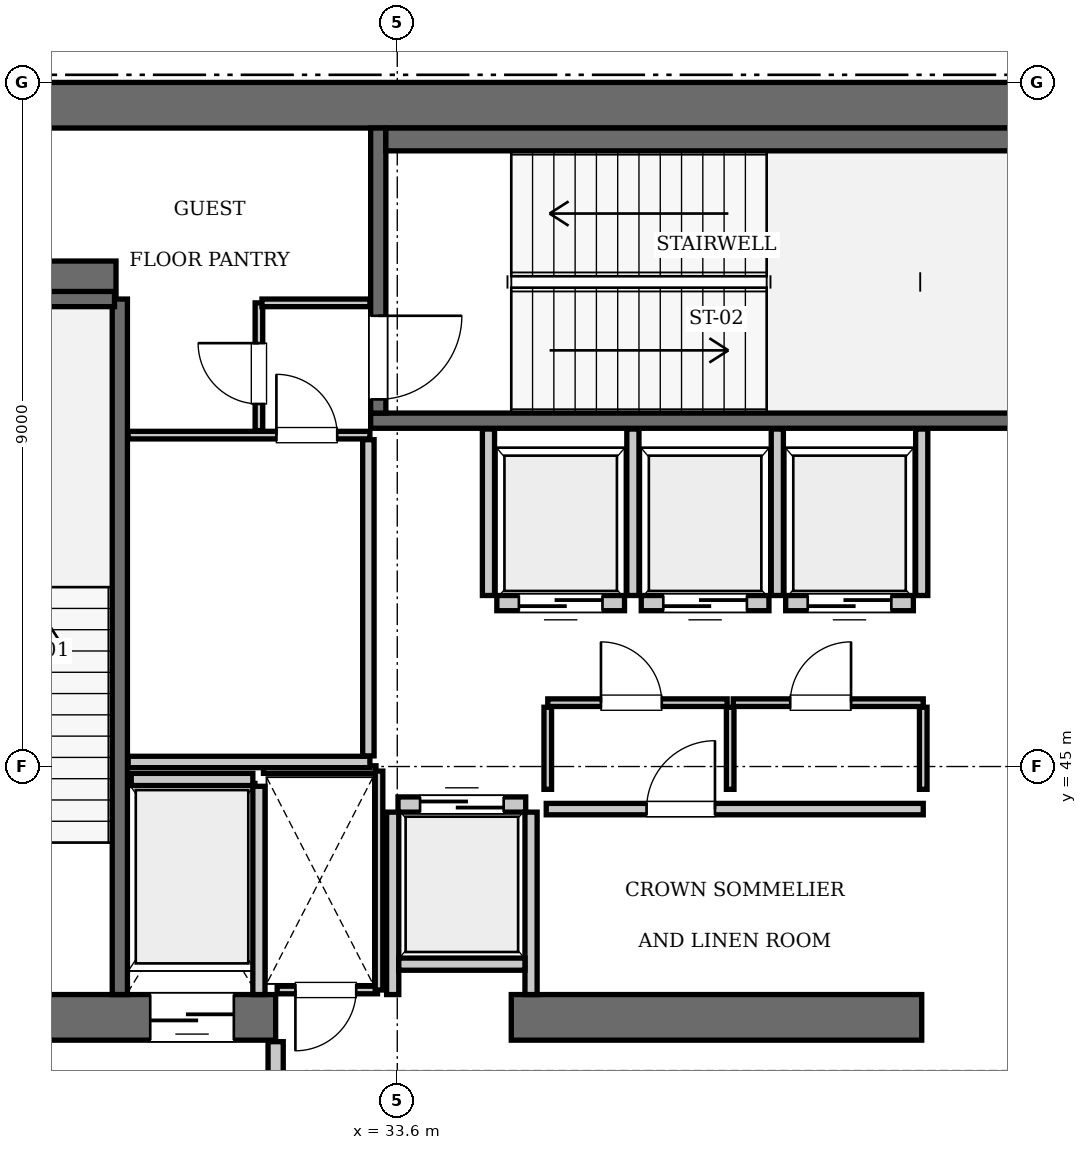
"""IFC4 building model, lengths in metres.
Left out: names, types, materials, properties, quantities, classifications, styles, units other than length and angle.
Written with IfcOpenShell. Run it as: python <this file> out.ifc"""

import sys

from ifc_helpers import new_model, si_unit, direction, frame, frame_2d, origin, place, context, subcontext, project, spatial, rectangle, extrude, element, fill, save


model = new_model("IFC4")
c1 = context("Model", 3, precision=1e-05, world=origin(), true_north=direction((0.0, 1.0)))
c2 = subcontext(c1, "Body", "Model", "MODEL_VIEW")
j1 = project(units=[si_unit("LENGTHUNIT", "METRE"), si_unit("PLANEANGLEUNIT", "RADIAN")], contexts=[c1])
p1 = place(None, origin())
s1 = spatial("IfcSite", under=j1, at=p1, CompositionType="ELEMENT")
p2 = place(p1, origin())
s2 = spatial("IfcBuilding", under=s1, at=p2, CompositionType="ELEMENT")
p3 = place(p2, frame((0.0, 0.0, 349.65)))
s3 = spatial("IfcBuildingStorey", under=s2, at=p3, CompositionType="ELEMENT", Elevation=349.65)
p4 = place(p3, frame((25.2, 53.7, 0.0), z_axis=(0.0, 0.0, 1.0), x_axis=(1.0, 0.0, 0.0)))
e1 = element("IfcWall", 1, at=p4, inside=s3, PredefinedType="SHEAR", context=c2, shape_type="SweptSolid", body=[
    extrude(rectangle(XDim=25.2, YDim=0.6, at=frame_2d((12.6, 0.0))), origin(), (0.0, 0.0, 1.0), 4.55),
])
p5 = place(p3, frame((25.2, 41.7, 0.0), z_axis=(0.0, 0.0, 1.0), x_axis=(1.0, 0.0, 0.0)))
e2 = element("IfcWall", 2, at=p5, inside=s3, PredefinedType="SHEAR", context=c2, shape_type="SweptSolid", body=[
    extrude(rectangle(XDim=6.8, YDim=0.6, at=frame_2d((3.4, 0.0))), origin(), (0.0, 0.0, 1.0), 4.55),
])
p6 = place(p5, frame((1.65, 0.0, 0.0)))
e3 = element("IfcOpeningElement", 3, at=p6, cuts=e2, PredefinedType="OPENING", context=c2, shape_type="SweptSolid", body=[
    extrude(rectangle(XDim=1.15, YDim=2.15, at=frame_2d((0.575, 1.075))), frame((0.0, 0.31, 0.0), z_axis=(0.0, -1.0, 0.0), x_axis=(1.0, 0.0, 0.0)), (0.0, 0.0, 1.0), 0.62),
])
p7 = place(p5, frame((5.15, 0.0, 0.0)))
e4 = element("IfcOpeningElement", 4, at=p7, cuts=e2, PredefinedType="OPENING", context=c2, shape_type="SweptSolid", body=[
    extrude(rectangle(XDim=1.1, YDim=2.2, at=frame_2d((0.55, 1.1))), frame((0.0, 0.31, 0.0), z_axis=(0.0, -1.0, 0.0), x_axis=(1.0, 0.0, 0.0)), (0.0, 0.0, 1.0), 0.62),
])
p8 = place(p3, frame((35.1, 41.7, 0.0), z_axis=(0.0, 0.0, 1.0), x_axis=(1.0, 0.0, 0.0)))
e5 = element("IfcWall", 5, at=p8, inside=s3, PredefinedType="SHEAR", context=c2, shape_type="SweptSolid", body=[
    extrude(rectangle(XDim=5.4, YDim=0.6, at=frame_2d((2.7, 0.0))), origin(), (0.0, 0.0, 1.0), 4.55),
])
p9 = place(p3, frame((25.8, 51.4, 0.0), z_axis=(0.0, 0.0, 1.0), x_axis=(1.0, 0.0, 0.0)))
e6 = element("IfcWall", 6, at=p9, inside=s3, PredefinedType="SHEAR", context=c2, shape_type="SweptSolid", body=[
    extrude(rectangle(XDim=4.1, YDim=0.5, at=frame_2d((2.05, 0.0))), origin(), (0.0, 0.0, 1.0), 4.55),
])
p10 = place(p3, frame((29.95, 42.0, 0.0), z_axis=(0.0, 0.0, 1.0), x_axis=(0.0, 1.0, 0.0)))
e7 = element("IfcWall", 7, at=p10, inside=s3, PredefinedType="SOLIDWALL", context=c2, shape_type="SweptSolid", body=[
    extrude(rectangle(XDim=9.15, YDim=0.2, at=frame_2d((4.575, 0.0))), origin(), (0.0, 0.0, 1.0), 4.29),
])
p11 = place(p3, frame((26.38, 51.15, 0.0), z_axis=(0.0, 0.0, 1.0), x_axis=(1.0, 0.0, 0.0)))
e8 = element("IfcWall", 8, at=p11, inside=s3, PredefinedType="SOLIDWALL", context=c2, shape_type="SweptSolid", body=[
    extrude(rectangle(XDim=3.5, YDim=0.2, at=frame_2d((1.75, 0.0))), origin(), (0.0, 0.0, 1.0), 4.29),
])
p12 = place(p3, frame((33.25, 49.55, 0.0), z_axis=(0.0, 0.0, 1.0), x_axis=(1.0, 0.0, 0.0)))
e9 = element("IfcWall", 9, at=p12, inside=s3, PredefinedType="SOLIDWALL", context=c2, shape_type="SweptSolid", body=[
    extrude(rectangle(XDim=9.1, YDim=0.2, at=frame_2d((4.55, 0.0))), origin(), (0.0, 0.0, 1.0), 4.29),
])
p13 = place(p3, frame((33.35, 49.65, 0.0), z_axis=(0.0, 0.0, 1.0), x_axis=(0.0, 1.0, 0.0)))
e10 = element("IfcWall", 10, at=p13, inside=s3, PredefinedType="SOLIDWALL", context=c2, shape_type="SweptSolid", body=[
    extrude(rectangle(XDim=3.75, YDim=0.2, at=frame_2d((1.875, 0.0))), origin(), (0.0, 0.0, 1.0), 4.29),
])
p14 = place(p13, frame((0.18, 0.0, 0.0)))
e11 = element("IfcOpeningElement", 11, at=p14, cuts=e10, PredefinedType="OPENING", context=c2, shape_type="SweptSolid", body=[
    extrude(rectangle(XDim=1.1, YDim=2.15, at=frame_2d((0.55, 1.075))), frame((0.0, 0.11, 0.0), z_axis=(0.0, -1.0, 0.0), x_axis=(1.0, 0.0, 0.0)), (0.0, 0.0, 1.0), 0.22),
])
p15 = place(p3, frame((33.45, 53.25, 0.0), z_axis=(0.0, 0.0, 1.0), x_axis=(1.0, 0.0, 0.0)))
e12 = element("IfcWall", 12, at=p15, inside=s3, PredefinedType="SOLIDWALL", context=c2, shape_type="SweptSolid", body=[
    extrude(rectangle(XDim=8.7, YDim=0.3, at=frame_2d((4.35, 0.0))), origin(), (0.0, 0.0, 1.0), 4.29),
])
p16 = place(p3, frame((34.91, 47.15, 0.0), z_axis=(0.0, 0.0, 1.0), x_axis=(1.0, 0.0, 0.0)))
e13 = element("IfcWall", 13, at=p16, inside=s3, PredefinedType="SOLIDWALL", context=c2, shape_type="SweptSolid", body=[
    extrude(rectangle(XDim=1.68, YDim=0.2, at=frame_2d((0.84, 0.0))), origin(), (0.0, 0.0, 1.0), 4.29),
])
p17 = place(p16, frame((0.29, 0.0, 0.0)))
e14 = element("IfcOpeningElement", 14, at=p17, cuts=e13, PredefinedType="OPENING", context=c2, shape_type="SweptSolid", body=[
    extrude(rectangle(XDim=1.1, YDim=2.2, at=frame_2d((0.55, 1.1))), frame((0.0, 0.11, 0.0), z_axis=(0.0, -1.0, 0.0), x_axis=(1.0, 0.0, 0.0)), (0.0, 0.0, 1.0), 0.22),
])
p18 = place(p3, frame((36.81, 47.15, 0.0), z_axis=(0.0, 0.0, 1.0), x_axis=(1.0, 0.0, 0.0)))
e15 = element("IfcWall", 15, at=p18, inside=s3, PredefinedType="SOLIDWALL", context=c2, shape_type="SweptSolid", body=[
    extrude(rectangle(XDim=1.68, YDim=0.2, at=frame_2d((0.84, 0.0))), origin(), (0.0, 0.0, 1.0), 4.29),
])
p19 = place(p18, frame((0.29, 0.0, 0.0)))
e16 = element("IfcOpeningElement", 16, at=p19, cuts=e15, PredefinedType="OPENING", context=c2, shape_type="SweptSolid", body=[
    extrude(rectangle(XDim=1.1, YDim=2.2, at=frame_2d((0.55, 1.1))), frame((0.0, 0.11, 0.0), z_axis=(0.0, -1.0, 0.0), x_axis=(1.0, 0.0, 0.0)), (0.0, 0.0, 1.0), 0.22),
])
p20 = place(p3, frame((38.71, 47.15, 0.0), z_axis=(0.0, 0.0, 1.0), x_axis=(1.0, 0.0, 0.0)))
e17 = element("IfcWall", 17, at=p20, inside=s3, PredefinedType="SOLIDWALL", context=c2, shape_type="SweptSolid", body=[
    extrude(rectangle(XDim=1.68, YDim=0.2, at=frame_2d((0.84, 0.0))), origin(), (0.0, 0.0, 1.0), 4.29),
])
p21 = place(p20, frame((0.29, 0.0, 0.0)))
e18 = element("IfcOpeningElement", 18, at=p21, cuts=e17, PredefinedType="OPENING", context=c2, shape_type="SweptSolid", body=[
    extrude(rectangle(XDim=1.1, YDim=2.2, at=frame_2d((0.55, 1.1))), frame((0.0, 0.11, 0.0), z_axis=(0.0, -1.0, 0.0), x_axis=(1.0, 0.0, 0.0)), (0.0, 0.0, 1.0), 0.22),
])
p22 = place(p3, frame((33.61, 44.5, 0.0), z_axis=(0.0, 0.0, 1.0), x_axis=(1.0, 0.0, 0.0)))
e19 = element("IfcWall", 19, at=p22, inside=s3, PredefinedType="SOLIDWALL", context=c2, shape_type="SweptSolid", body=[
    extrude(rectangle(XDim=1.68, YDim=0.2, at=frame_2d((0.84, 0.0))), origin(), (0.0, 0.0, 1.0), 4.29),
])
p23 = place(p22, frame((0.29, 0.0, 0.0)))
e20 = element("IfcOpeningElement", 20, at=p23, cuts=e19, PredefinedType="OPENING", context=c2, shape_type="SweptSolid", body=[
    extrude(rectangle(XDim=1.1, YDim=2.2, at=frame_2d((0.55, 1.1))), frame((0.0, 0.11, 0.0), z_axis=(0.0, -1.0, 0.0), x_axis=(1.0, 0.0, 0.0)), (0.0, 0.0, 1.0), 0.22),
])
p24 = place(p3, frame((30.1, 44.83, 0.0), z_axis=(0.0, 0.0, 1.0), x_axis=(1.0, 0.0, 0.0)))
e21 = element("IfcWall", 21, at=p24, inside=s3, PredefinedType="SOLIDWALL", context=c2, shape_type="SweptSolid", body=[
    extrude(rectangle(XDim=1.6, YDim=0.16, at=frame_2d((0.8, 0.0))), origin(), (0.0, 0.0, 1.0), 4.29),
])
p25 = place(p3, frame((31.78, 42.0, 0.0), z_axis=(0.0, 0.0, 1.0), x_axis=(0.0, 1.0, 0.0)))
e22 = element("IfcWall", 22, at=p25, inside=s3, PredefinedType="SOLIDWALL", context=c2, shape_type="SweptSolid", body=[
    extrude(rectangle(XDim=2.74, YDim=0.16, at=frame_2d((1.37, 0.0))), origin(), (0.0, 0.0, 1.0), 4.29),
])
for number, where, z_axis, x_axis in (
    (23, (34.8, 47.25, 0.0), (0.0, 0.0, 1.0), (0.0, 1.0, 0.0)),
    (24, (36.7, 47.25, 0.0), (0.0, 0.0, 1.0), (0.0, 1.0, 0.0)),
    (25, (38.6, 47.25, 0.0), (0.0, 0.0, 1.0), (0.0, 1.0, 0.0)),
    (26, (40.5, 47.25, 0.0), (0.0, 0.0, 1.0), (0.0, 1.0, 0.0)),
):
    element("IfcWall", number, at=place(p3, frame(where, z_axis=z_axis, x_axis=x_axis)), inside=s3, PredefinedType="SOLIDWALL", context=c2, shape_type="SweptSolid", body=[
        extrude(rectangle(XDim=2.19, YDim=0.16, at=frame_2d((1.095, 0.0))), origin(), (0.0, 0.0, 1.0), 4.29),
    ])
for number, where, z_axis, x_axis in (
    (27, (33.54, 42.0, 0.0), (0.0, 0.0, 1.0), (0.0, 1.0, 0.0)),
    (28, (35.36, 42.0, 0.0), (0.0, 0.0, 1.0), (0.0, 1.0, 0.0)),
):
    element("IfcWall", number, at=place(p3, frame(where, z_axis=z_axis, x_axis=x_axis)), inside=s3, PredefinedType="SOLIDWALL", context=c2, shape_type="SweptSolid", body=[
        extrude(rectangle(XDim=2.4, YDim=0.16, at=frame_2d((1.2, 0.0))), origin(), (0.0, 0.0, 1.0), 4.29),
    ])
p26 = place(p3, frame((33.62, 42.4, 0.0), z_axis=(0.0, 0.0, 1.0), x_axis=(1.0, 0.0, 0.0)))
e29 = element("IfcWall", 29, at=p26, inside=s3, PredefinedType="SOLIDWALL", context=c2, shape_type="SweptSolid", body=[
    extrude(rectangle(XDim=1.66, YDim=0.16, at=frame_2d((0.83, 0.0))), origin(), (0.0, 0.0, 1.0), 4.29),
])
p27 = place(p3, frame((32.0, 38.31, 0.0), z_axis=(0.0, 0.0, 1.0), x_axis=(0.0, 1.0, 0.0)))
e30 = element("IfcWall", 30, at=p27, inside=s3, PredefinedType="PARTITIONING", context=c2, shape_type="SweptSolid", body=[
    extrude(rectangle(XDim=3.07, YDim=0.2, at=frame_2d((1.535, 0.0))), origin(), (0.0, 0.0, 1.0), 4.29),
])
p28 = place(p3, frame((32.02, 42.06, 0.0), z_axis=(0.0, 0.0, 1.0), x_axis=(1.0, 0.0, 0.0)))
e31 = element("IfcWall", 31, at=p28, inside=s3, PredefinedType="PARTITIONING", context=c2, shape_type="SweptSolid", body=[
    extrude(rectangle(XDim=1.32, YDim=0.1, at=frame_2d((0.66, 0.0))), origin(), (0.0, 0.0, 1.0), 4.29),
])
p29 = place(p28, frame((0.24, 0.0, 0.0)))
e32 = element("IfcOpeningElement", 32, at=p29, cuts=e31, PredefinedType="OPENING", context=c2, shape_type="SweptSolid", body=[
    extrude(rectangle(XDim=0.8, YDim=2.05, at=frame_2d((0.4, 1.025))), frame((0.0, 0.06, 0.0), z_axis=(0.0, -1.0, 0.0), x_axis=(1.0, 0.0, 0.0)), (0.0, 0.0, 1.0), 0.12),
])
p30 = place(p3, frame((31.84, 44.96, 0.0), z_axis=(0.0, 0.0, 1.0), x_axis=(1.0, 0.0, 0.0)))
e33 = element("IfcWall", 33, at=p30, inside=s3, PredefinedType="PARTITIONING", context=c2, shape_type="SweptSolid", body=[
    extrude(rectangle(XDim=1.48, YDim=0.1, at=frame_2d((0.74, 0.0))), origin(), (0.0, 0.0, 1.0), 4.29),
])
p31 = place(p3, frame((33.36, 42.06, 0.0), z_axis=(0.0, 0.0, 1.0), x_axis=(0.0, 1.0, 0.0)))
e34 = element("IfcWall", 34, at=p31, inside=s3, PredefinedType="PARTITIONING", context=c2, shape_type="SweptSolid", body=[
    extrude(rectangle(XDim=2.88, YDim=0.1, at=frame_2d((1.44, 0.0))), origin(), (0.0, 0.0, 1.0), 4.29),
])
p32 = place(p3, frame((35.58, 45.84, 0.0), z_axis=(0.0, 0.0, 1.0), x_axis=(1.0, 0.0, 0.0)))
e35 = element("IfcWall", 35, at=p32, inside=s3, PredefinedType="PARTITIONING", context=c2, shape_type="SweptSolid", body=[
    extrude(rectangle(XDim=2.36, YDim=0.1, at=frame_2d((1.18, 0.0))), origin(), (0.0, 0.0, 1.0), 4.29),
])
p33 = place(p32, frame((0.7, 0.0, 0.0)))
e36 = element("IfcOpeningElement", 36, at=p33, cuts=e35, PredefinedType="OPENING", context=c2, shape_type="SweptSolid", body=[
    extrude(rectangle(XDim=0.8, YDim=2.05, at=frame_2d((0.4, 1.025))), frame((0.0, 0.06, 0.0), z_axis=(0.0, -1.0, 0.0), x_axis=(1.0, 0.0, 0.0)), (0.0, 0.0, 1.0), 0.12),
])
p34 = place(p3, frame((38.02, 45.84, 0.0), z_axis=(0.0, 0.0, 1.0), x_axis=(1.0, 0.0, 0.0)))
e37 = element("IfcWall", 37, at=p34, inside=s3, PredefinedType="PARTITIONING", context=c2, shape_type="SweptSolid", body=[
    extrude(rectangle(XDim=2.5, YDim=0.1, at=frame_2d((1.25, 0.0))), origin(), (0.0, 0.0, 1.0), 4.29),
])
p35 = place(p34, frame((0.75, 0.0, 0.0)))
e38 = element("IfcOpeningElement", 38, at=p35, cuts=e37, PredefinedType="OPENING", context=c2, shape_type="SweptSolid", body=[
    extrude(rectangle(XDim=0.8, YDim=2.05, at=frame_2d((0.4, 1.025))), frame((0.0, 0.06, 0.0), z_axis=(0.0, -1.0, 0.0), x_axis=(1.0, 0.0, 0.0)), (0.0, 0.0, 1.0), 0.12),
])
for number, where, z_axis, x_axis in (
    (39, (35.58, 44.7, 0.0), (0.0, 0.0, 1.0), (0.0, 1.0, 0.0)),
    (40, (37.98, 44.7, 0.0), (0.0, 0.0, 1.0), (0.0, 1.0, 0.0)),
    (41, (40.52, 44.7, 0.0), (0.0, 0.0, 1.0), (0.0, 1.0, 0.0)),
):
    element("IfcWall", number, at=place(p3, frame(where, z_axis=z_axis, x_axis=x_axis)), inside=s3, PredefinedType="PARTITIONING", context=c2, shape_type="SweptSolid", body=[
        extrude(rectangle(XDim=1.08, YDim=0.1, at=frame_2d((0.54, 0.0))), origin(), (0.0, 0.0, 1.0), 4.29),
    ])
p36 = place(p3, frame((35.56, 44.44, 0.0), z_axis=(0.0, 0.0, 1.0), x_axis=(1.0, 0.0, 0.0)))
e42 = element("IfcWall", 42, at=p36, inside=s3, PredefinedType="PARTITIONING", context=c2, shape_type="SweptSolid", body=[
    extrude(rectangle(XDim=4.96, YDim=0.15, at=frame_2d((2.48, 0.0))), origin(), (0.0, 0.0, 1.0), 4.29),
])
p37 = place(p36, frame((1.32, 0.0, 0.0)))
e43 = element("IfcOpeningElement", 43, at=p37, cuts=e42, PredefinedType="OPENING", context=c2, shape_type="SweptSolid", body=[
    extrude(rectangle(XDim=0.9, YDim=2.1, at=frame_2d((0.45, 1.05))), frame((0.0, 0.085, 0.0), z_axis=(0.0, -1.0, 0.0), x_axis=(1.0, 0.0, 0.0)), (0.0, 0.0, 1.0), 0.17),
])
p38 = place(p3, frame((30.06, 45.06, 0.0), z_axis=(0.0, 0.0, 1.0), x_axis=(1.0, 0.0, 0.0)))
e44 = element("IfcWall", 44, at=p38, inside=s3, PredefinedType="PARTITIONING", context=c2, shape_type="SweptSolid", body=[
    extrude(rectangle(XDim=3.18, YDim=0.15, at=frame_2d((1.59, 0.0))), origin(), (0.0, 0.0, 1.0), 4.29),
])
p39 = place(p3, frame((33.22, 45.14, 0.0), z_axis=(0.0, 0.0, 1.0), x_axis=(0.0, 1.0, 0.0)))
e45 = element("IfcWall", 45, at=p39, inside=s3, PredefinedType="PARTITIONING", context=c2, shape_type="SweptSolid", body=[
    extrude(rectangle(XDim=4.16, YDim=0.15, at=frame_2d((2.08, 0.0))), origin(), (0.0, 0.0, 1.0), 4.29),
])
p40 = place(p3, frame((30.06, 49.36, 0.0), z_axis=(0.0, 0.0, 1.0), x_axis=(1.0, 0.0, 0.0)))
e46 = element("IfcWall", 46, at=p40, inside=s3, PredefinedType="PARTITIONING", context=c2, shape_type="SweptSolid", body=[
    extrude(rectangle(XDim=3.18, YDim=0.1, at=frame_2d((1.59, 0.0))), origin(), (0.0, 0.0, 1.0), 4.29),
])
p41 = place(p40, frame((1.95, 0.0, 0.0)))
e47 = element("IfcOpeningElement", 47, at=p41, cuts=e46, PredefinedType="OPENING", context=c2, shape_type="SweptSolid", body=[
    extrude(rectangle(XDim=0.8, YDim=2.05, at=frame_2d((0.4, 1.025))), frame((0.0, 0.06, 0.0), z_axis=(0.0, -1.0, 0.0), x_axis=(1.0, 0.0, 0.0)), (0.0, 0.0, 1.0), 0.12),
])
p42 = place(p3, frame((31.78, 49.42, 0.0), z_axis=(0.0, 0.0, 1.0), x_axis=(0.0, 1.0, 0.0)))
e48 = element("IfcWall", 48, at=p42, inside=s3, PredefinedType="PARTITIONING", context=c2, shape_type="SweptSolid", body=[
    extrude(rectangle(XDim=1.68, YDim=0.1, at=frame_2d((0.84, 0.0))), origin(), (0.0, 0.0, 1.0), 4.29),
])
p43 = place(p42, frame((0.35, 0.0, 0.0)))
e49 = element("IfcOpeningElement", 49, at=p43, cuts=e48, PredefinedType="OPENING", context=c2, shape_type="SweptSolid", body=[
    extrude(rectangle(XDim=0.8, YDim=2.05, at=frame_2d((0.4, 1.025))), frame((0.0, 0.06, 0.0), z_axis=(0.0, -1.0, 0.0), x_axis=(1.0, 0.0, 0.0)), (0.0, 0.0, 1.0), 0.12),
])
p44 = place(p3, frame((31.82, 51.1, 0.0), z_axis=(0.0, 0.0, 1.0), x_axis=(1.0, 0.0, 0.0)))
e50 = element("IfcWall", 50, at=p44, inside=s3, PredefinedType="PARTITIONING", context=c2, shape_type="SweptSolid", body=[
    extrude(rectangle(XDim=1.42, YDim=0.1, at=frame_2d((0.71, 0.0))), origin(), (0.0, 0.0, 1.0), 4.29),
])
p45 = place(p14, frame((1.1, 0.0, 0.0), z_axis=(0.0, 0.0, 1.0), x_axis=(-1.0, 0.0, 0.0)))
e51 = element("IfcDoor", 51, at=p45, inside=s3, OperationType="SINGLE_SWING_LEFT", PredefinedType="DOOR", context=c2, shape_type="SweptSolid", body=[
    extrude(rectangle(XDim=1.1, YDim=2.15, at=frame_2d((0.55, 1.075))), frame((0.0, 0.025, 0.0), z_axis=(0.0, -1.0, 0.0), x_axis=(1.0, 0.0, 0.0)), (0.0, 0.0, 1.0), 0.05),
])
fill(e11, e51)
p46 = place(p17, frame((1.1, 0.0, 0.0), z_axis=(0.0, 0.0, 1.0), x_axis=(-1.0, 0.0, 0.0)))
e52 = element("IfcDoor", 52, at=p46, inside=s3, OperationType="SLIDING_TO_RIGHT", PredefinedType="DOOR", context=c2, shape_type="SweptSolid", body=[
    extrude(rectangle(XDim=1.1, YDim=2.2, at=frame_2d((0.55, 1.1))), frame((0.0, 0.025, 0.0), z_axis=(0.0, -1.0, 0.0), x_axis=(1.0, 0.0, 0.0)), (0.0, 0.0, 1.0), 0.05),
])
fill(e14, e52)
p47 = place(p19, frame((1.1, 0.0, 0.0), z_axis=(0.0, 0.0, 1.0), x_axis=(-1.0, 0.0, 0.0)))
e53 = element("IfcDoor", 53, at=p47, inside=s3, OperationType="SLIDING_TO_RIGHT", PredefinedType="DOOR", context=c2, shape_type="SweptSolid", body=[
    extrude(rectangle(XDim=1.1, YDim=2.2, at=frame_2d((0.55, 1.1))), frame((0.0, 0.025, 0.0), z_axis=(0.0, -1.0, 0.0), x_axis=(1.0, 0.0, 0.0)), (0.0, 0.0, 1.0), 0.05),
])
fill(e16, e53)
p48 = place(p21, frame((1.1, 0.0, 0.0), z_axis=(0.0, 0.0, 1.0), x_axis=(-1.0, 0.0, 0.0)))
e54 = element("IfcDoor", 54, at=p48, inside=s3, OperationType="SLIDING_TO_RIGHT", PredefinedType="DOOR", context=c2, shape_type="SweptSolid", body=[
    extrude(rectangle(XDim=1.1, YDim=2.2, at=frame_2d((0.55, 1.1))), frame((0.0, 0.025, 0.0), z_axis=(0.0, -1.0, 0.0), x_axis=(1.0, 0.0, 0.0)), (0.0, 0.0, 1.0), 0.05),
])
fill(e18, e54)
p49 = place(p23, origin())
e55 = element("IfcDoor", 55, at=p49, inside=s3, OperationType="SLIDING_TO_RIGHT", PredefinedType="DOOR", context=c2, shape_type="SweptSolid", body=[
    extrude(rectangle(XDim=1.1, YDim=2.2, at=frame_2d((0.55, 1.1))), frame((0.0, 0.025, 0.0), z_axis=(0.0, -1.0, 0.0), x_axis=(1.0, 0.0, 0.0)), (0.0, 0.0, 1.0), 0.05),
])
fill(e20, e55)
p50 = place(p7, frame((1.1, 0.0, 0.0), z_axis=(0.0, 0.0, 1.0), x_axis=(-1.0, 0.0, 0.0)))
e56 = element("IfcDoor", 56, at=p50, inside=s3, OperationType="SLIDING_TO_LEFT", PredefinedType="DOOR", context=c2, shape_type="SweptSolid", body=[
    extrude(rectangle(XDim=1.1, YDim=2.2, at=frame_2d((0.55, 1.1))), frame((0.0, 0.025, 0.0), z_axis=(0.0, -1.0, 0.0), x_axis=(1.0, 0.0, 0.0)), (0.0, 0.0, 1.0), 0.05),
])
fill(e4, e56)
p51 = place(p29, frame((0.8, 0.0, 0.0), z_axis=(0.0, 0.0, 1.0), x_axis=(-1.0, 0.0, 0.0)))
e57 = element("IfcDoor", 57, at=p51, inside=s3, OperationType="SINGLE_SWING_RIGHT", PredefinedType="DOOR", context=c2, shape_type="SweptSolid", body=[
    extrude(rectangle(XDim=0.8, YDim=2.05, at=frame_2d((0.4, 1.025))), frame((0.0, 0.025, 0.0), z_axis=(0.0, -1.0, 0.0), x_axis=(1.0, 0.0, 0.0)), (0.0, 0.0, 1.0), 0.05),
])
fill(e32, e57)
p52 = place(p33, origin())
e58 = element("IfcDoor", 58, at=p52, inside=s3, OperationType="SINGLE_SWING_LEFT", PredefinedType="DOOR", context=c2, shape_type="SweptSolid", body=[
    extrude(rectangle(XDim=0.8, YDim=2.05, at=frame_2d((0.4, 1.025))), frame((0.0, 0.025, 0.0), z_axis=(0.0, -1.0, 0.0), x_axis=(1.0, 0.0, 0.0)), (0.0, 0.0, 1.0), 0.05),
])
fill(e36, e58)
p53 = place(p35, origin())
e59 = element("IfcDoor", 59, at=p53, inside=s3, OperationType="SINGLE_SWING_RIGHT", PredefinedType="DOOR", context=c2, shape_type="SweptSolid", body=[
    extrude(rectangle(XDim=0.8, YDim=2.05, at=frame_2d((0.4, 1.025))), frame((0.0, 0.025, 0.0), z_axis=(0.0, -1.0, 0.0), x_axis=(1.0, 0.0, 0.0)), (0.0, 0.0, 1.0), 0.05),
])
fill(e38, e59)
p54 = place(p37, origin())
e60 = element("IfcDoor", 60, at=p54, inside=s3, OperationType="SINGLE_SWING_RIGHT", PredefinedType="DOOR", context=c2, shape_type="SweptSolid", body=[
    extrude(rectangle(XDim=0.9, YDim=2.1, at=frame_2d((0.45, 1.05))), frame((0.0, 0.025, 0.0), z_axis=(0.0, -1.0, 0.0), x_axis=(1.0, 0.0, 0.0)), (0.0, 0.0, 1.0), 0.05),
])
fill(e43, e60)
p55 = place(p41, origin())
e61 = element("IfcDoor", 61, at=p55, inside=s3, OperationType="SINGLE_SWING_LEFT", PredefinedType="DOOR", context=c2, shape_type="SweptSolid", body=[
    extrude(rectangle(XDim=0.8, YDim=2.05, at=frame_2d((0.4, 1.025))), frame((0.0, 0.025, 0.0), z_axis=(0.0, -1.0, 0.0), x_axis=(1.0, 0.0, 0.0)), (0.0, 0.0, 1.0), 0.05),
])
fill(e47, e61)
p56 = place(p43, origin())
e62 = element("IfcDoor", 62, at=p56, inside=s3, OperationType="SINGLE_SWING_RIGHT", PredefinedType="DOOR", context=c2, shape_type="SweptSolid", body=[
    extrude(rectangle(XDim=0.8, YDim=2.05, at=frame_2d((0.4, 1.025))), frame((0.0, 0.025, 0.0), z_axis=(0.0, -1.0, 0.0), x_axis=(1.0, 0.0, 0.0)), (0.0, 0.0, 1.0), 0.05),
])
fill(e49, e62)
save(model, sys.argv[1])
